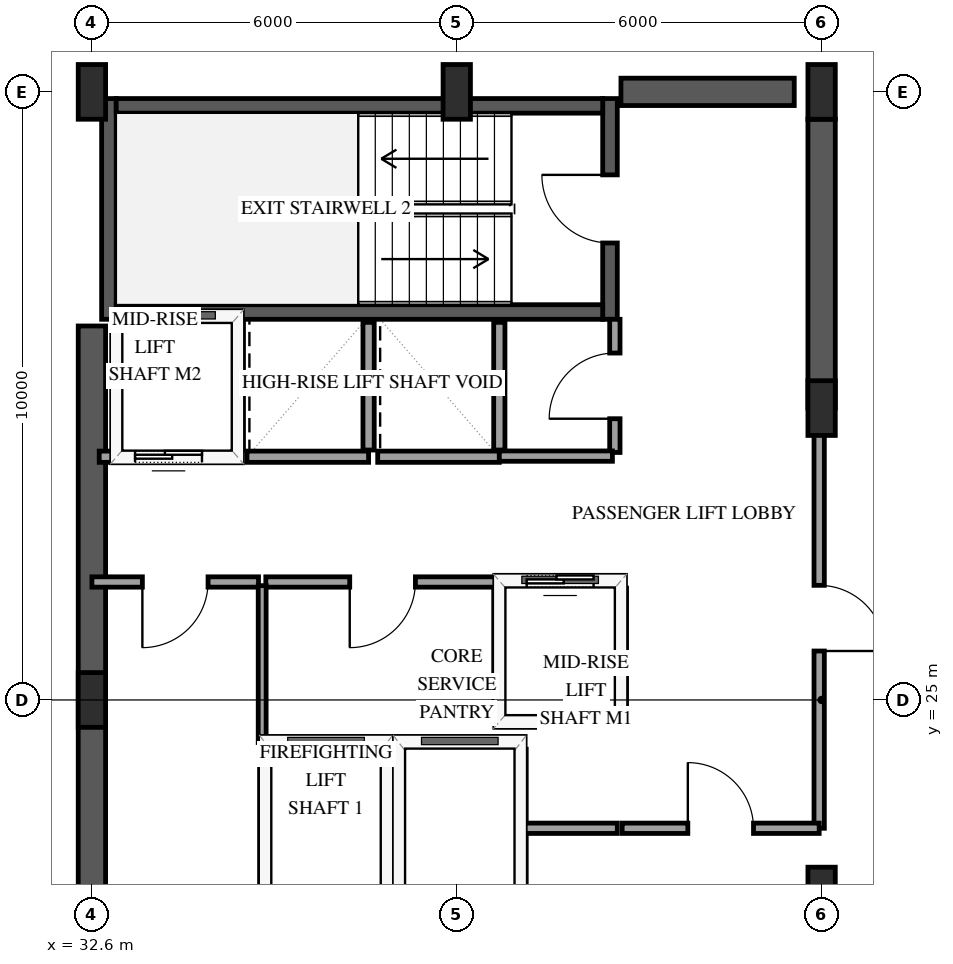
"""IFC4 building model, lengths in metres.
Left out: names, types, materials, properties, quantities, classifications, styles, units other than length and angle.
Written with IfcOpenShell. Run it as: python <this file> out.ifc"""

import sys

from ifc_helpers import new_model, si_unit, direction, frame, frame_2d, origin, origin_2d, place, context, subcontext, project, spatial, rectangle, extrude, element, fill, save


model = new_model("IFC4")
c1 = context("Model", 3, precision=1e-05, world=origin(), true_north=direction((0.0, 1.0)))
c2 = subcontext(c1, "Body", "Model", "MODEL_VIEW")
j1 = project(units=[si_unit("LENGTHUNIT", "METRE"), si_unit("PLANEANGLEUNIT", "RADIAN")], contexts=[c1])
p1 = place(None, origin())
s1 = spatial("IfcSite", under=j1, at=p1, CompositionType="ELEMENT")
p2 = place(p1, origin())
s2 = spatial("IfcBuilding", under=s1, at=p2, CompositionType="ELEMENT")
p3 = place(p2, frame((0.0, 0.0, 223.0)))
s3 = spatial("IfcBuildingStorey", under=s2, at=p3, CompositionType="ELEMENT", Elevation=223.0)
p4 = place(p3, frame((32.88, 31.26, 0.0), z_axis=(0.0, 0.0, 1.0), x_axis=(0.0, 1.0, 0.0)))
e1 = element("IfcWall", 1, at=p4, inside=s3, PredefinedType="SHEAR", context=c2, shape_type="SweptSolid", body=[
    extrude(rectangle(XDim=3.63, YDim=0.24, at=frame_2d((1.815, 0.0))), origin(), (0.0, 0.0, 1.0), 3.6),
])
p5 = place(p3, frame((41.12, 31.26, 0.0), z_axis=(0.0, 0.0, 1.0), x_axis=(0.0, 1.0, 0.0)))
e2 = element("IfcWall", 2, at=p5, inside=s3, PredefinedType="SHEAR", context=c2, shape_type="SweptSolid", body=[
    extrude(rectangle(XDim=3.63, YDim=0.24, at=frame_2d((1.815, 0.0))), origin(), (0.0, 0.0, 1.0), 3.6),
])
p6 = place(p5, frame((1.255, 0.0, 0.0)))
e3 = element("IfcOpeningElement", 3, at=p6, cuts=e2, PredefinedType="OPENING", context=c2, shape_type="SweptSolid", body=[
    extrude(rectangle(XDim=1.12, YDim=2.15, at=frame_2d((0.56, 1.075))), frame((0.0, 0.13, 0.0), z_axis=(0.0, -1.0, 0.0), x_axis=(1.0, 0.0, 0.0)), (0.0, 0.0, 1.0), 0.26),
])
for number, where, z_axis, x_axis in (
    (4, (33.0, 31.38, 0.0), (0.0, 0.0, 1.0), (1.0, 0.0, 0.0)),
    (5, (33.0, 34.77, 0.0), (0.0, 0.0, 1.0), (1.0, 0.0, 0.0)),
):
    element("IfcWall", number, at=place(p3, frame(where, z_axis=z_axis, x_axis=x_axis)), inside=s3, PredefinedType="SHEAR", context=c2, shape_type="SweptSolid", body=[
        extrude(rectangle(XDim=8.0, YDim=0.24, at=frame_2d((4.0, 0.0))), origin(), (0.0, 0.0, 1.0), 3.6),
    ])
p7 = place(p3, frame((32.6, 18.85, 0.0), z_axis=(0.0, 0.0, 1.0), x_axis=(0.0, 1.0, 0.0)))
e6 = element("IfcWall", 6, at=p7, inside=s3, PredefinedType="SHEAR", context=c2, shape_type="SweptSolid", body=[
    extrude(rectangle(XDim=12.3, YDim=0.45, at=frame_2d((6.15, 0.0))), origin(), (0.0, 0.0, 1.0), 3.6),
])
p8 = place(p3, frame((41.3, 35.0, 0.0), z_axis=(0.0, 0.0, 1.0), x_axis=(1.0, 0.0, 0.0)))
e7 = element("IfcWall", 7, at=p8, inside=s3, PredefinedType="SHEAR", context=c2, shape_type="SweptSolid", body=[
    extrude(rectangle(XDim=2.85, YDim=0.45, at=frame_2d((1.425, 0.0))), origin(), (0.0, 0.0, 1.0), 3.6),
])
p9 = place(p3, frame((44.6, 29.8, 0.0), z_axis=(0.0, 0.0, 1.0), x_axis=(0.0, 1.0, 0.0)))
e8 = element("IfcWall", 8, at=p9, inside=s3, PredefinedType="SHEAR", context=c2, shape_type="SweptSolid", body=[
    extrude(rectangle(XDim=4.75, YDim=0.45, at=frame_2d((2.375, 0.0))), origin(), (0.0, 0.0, 1.0), 3.6),
])
for number, where, z_axis, x_axis in (
    (9, (32.6, 25.0, 0.0), (0.0, 0.0, 1.0), (1.0, 0.0, 0.0)),
    (10, (32.6, 35.0, 0.0), (0.0, 0.0, 1.0), (1.0, 0.0, 0.0)),
    (11, (38.6, 35.0, 0.0), (0.0, 0.0, 1.0), (1.0, 0.0, 0.0)),
    (12, (44.6, 21.8, 0.0), (0.0, 0.0, 1.0), (1.0, 0.0, 0.0)),
    (13, (44.6, 29.8, 0.0), (0.0, 0.0, 1.0), (1.0, 0.0, 0.0)),
    (14, (44.6, 35.0, 0.0), (0.0, 0.0, 1.0), (1.0, 0.0, 0.0)),
):
    element("IfcColumn", number, at=place(p3, frame(where, z_axis=z_axis, x_axis=x_axis)), inside=s3, PredefinedType="PILASTER", context=c2, shape_type="SweptSolid", body=[
        extrude(rectangle(XDim=0.45, YDim=0.9, at=origin_2d()), origin(), (0.0, 0.0, 1.0), 3.6),
    ])
p10 = place(p3, frame((35.45, 24.3, 0.0), z_axis=(0.0, 0.0, 1.0), x_axis=(1.0, 0.0, 0.0)))
e15 = element("IfcWall", 15, at=p10, inside=s3, PredefinedType="SOLIDWALL", context=c2, shape_type="SweptSolid", body=[
    extrude(rectangle(XDim=2.0, YDim=0.185, at=frame_2d((1.0, 0.0))), origin(), (0.0, 0.0, 1.0), 3.3),
])
for number, where, z_axis, x_axis in (
    (16, (35.45, 21.81, 0.0), (0.0, 0.0, 1.0), (0.0, 1.0, 0.0)),
    (17, (37.45, 21.81, 0.0), (0.0, 0.0, 1.0), (0.0, 1.0, 0.0)),
):
    element("IfcWall", number, at=place(p3, frame(where, z_axis=z_axis, x_axis=x_axis)), inside=s3, PredefinedType="SOLIDWALL", context=c2, shape_type="SweptSolid", body=[
        extrude(rectangle(XDim=2.38, YDim=0.185, at=frame_2d((1.19, 0.0))), origin(), (0.0, 0.0, 1.0), 3.3),
    ])
p11 = place(p3, frame((37.65, 24.3, 0.0), z_axis=(0.0, 0.0, 1.0), x_axis=(1.0, 0.0, 0.0)))
e18 = element("IfcWall", 18, at=p11, inside=s3, PredefinedType="SOLIDWALL", context=c2, shape_type="SweptSolid", body=[
    extrude(rectangle(XDim=2.0, YDim=0.185, at=frame_2d((1.0, 0.0))), origin(), (0.0, 0.0, 1.0), 3.3),
])
p12 = place(p3, frame((39.65, 21.81, 0.0), z_axis=(0.0, 0.0, 1.0), x_axis=(0.0, 1.0, 0.0)))
e19 = element("IfcWall", 19, at=p12, inside=s3, PredefinedType="SOLIDWALL", context=c2, shape_type="SweptSolid", body=[
    extrude(rectangle(XDim=2.38, YDim=0.185, at=frame_2d((1.19, 0.0))), origin(), (0.0, 0.0, 1.0), 3.3),
])
p13 = place(p3, frame((39.3, 24.65, 0.0), z_axis=(0.0, 0.0, 1.0), x_axis=(1.0, 0.0, 0.0)))
e20 = element("IfcWall", 20, at=p13, inside=s3, PredefinedType="SOLIDWALL", context=c2, shape_type="SweptSolid", body=[
    extrude(rectangle(XDim=2.0, YDim=0.185, at=frame_2d((1.0, 0.0))), origin(), (0.0, 0.0, 1.0), 3.3),
])
p14 = place(p3, frame((39.3, 26.95, 0.0), z_axis=(0.0, 0.0, 1.0), x_axis=(1.0, 0.0, 0.0)))
e21 = element("IfcWall", 21, at=p14, inside=s3, PredefinedType="SOLIDWALL", context=c2, shape_type="SweptSolid", body=[
    extrude(rectangle(XDim=2.0, YDim=0.185, at=frame_2d((1.0, 0.0))), origin(), (0.0, 0.0, 1.0), 3.3),
])
p15 = place(p14, frame((0.45, 0.0, 0.0)))
e22 = element("IfcOpeningElement", 22, at=p15, cuts=e21, PredefinedType="OPENING", context=c2, shape_type="SweptSolid", body=[
    extrude(rectangle(XDim=1.1, YDim=2.15, at=frame_2d((0.55, 1.075))), frame((0.0, 0.103, 0.0), z_axis=(0.0, -1.0, 0.0), x_axis=(1.0, 0.0, 0.0)), (0.0, 0.0, 1.0), 0.205),
])
for number, where, z_axis, x_axis in (
    (23, (39.3, 24.76, 0.0), (0.0, 0.0, 1.0), (0.0, 1.0, 0.0)),
    (24, (41.3, 24.76, 0.0), (0.0, 0.0, 1.0), (0.0, 1.0, 0.0)),
):
    element("IfcWall", number, at=place(p3, frame(where, z_axis=z_axis, x_axis=x_axis)), inside=s3, PredefinedType="SOLIDWALL", context=c2, shape_type="SweptSolid", body=[
        extrude(rectangle(XDim=2.08, YDim=0.185, at=frame_2d((1.04, 0.0))), origin(), (0.0, 0.0, 1.0), 3.3),
    ])
p16 = place(p3, frame((32.72, 29.0, 0.0), z_axis=(0.0, 0.0, 1.0), x_axis=(1.0, 0.0, 0.0)))
e25 = element("IfcWall", 25, at=p16, inside=s3, PredefinedType="SOLIDWALL", context=c2, shape_type="SweptSolid", body=[
    extrude(rectangle(XDim=2.28, YDim=0.185, at=frame_2d((1.14, 0.0))), origin(), (0.0, 0.0, 1.0), 3.3),
])
p17 = place(p16, frame((0.59, 0.0, 0.0)))
e26 = element("IfcOpeningElement", 26, at=p17, cuts=e25, PredefinedType="OPENING", context=c2, shape_type="SweptSolid", body=[
    extrude(rectangle(XDim=1.1, YDim=2.15, at=frame_2d((0.55, 1.075))), frame((0.0, 0.103, 0.0), z_axis=(0.0, -1.0, 0.0), x_axis=(1.0, 0.0, 0.0)), (0.0, 0.0, 1.0), 0.205),
])
p18 = place(p3, frame((35.0, 29.11, 0.0), z_axis=(0.0, 0.0, 1.0), x_axis=(0.0, 1.0, 0.0)))
e27 = element("IfcWall", 27, at=p18, inside=s3, PredefinedType="SOLIDWALL", context=c2, shape_type="SweptSolid", body=[
    extrude(rectangle(XDim=2.1, YDim=0.185, at=frame_2d((1.05, 0.0))), origin(), (0.0, 0.0, 1.0), 3.3),
])
p19 = place(p3, frame((35.15, 29.0, 0.0), z_axis=(0.0, 0.0, 1.0), x_axis=(1.0, 0.0, 0.0)))
e28 = element("IfcWall", 28, at=p19, inside=s3, PredefinedType="SOLIDWALL", context=c2, shape_type="SweptSolid", body=[
    extrude(rectangle(XDim=2.0, YDim=0.185, at=frame_2d((1.0, 0.0))), origin(), (0.0, 0.0, 1.0), 3.3),
])
p20 = place(p3, frame((37.15, 29.11, 0.0), z_axis=(0.0, 0.0, 1.0), x_axis=(0.0, 1.0, 0.0)))
e29 = element("IfcWall", 29, at=p20, inside=s3, PredefinedType="SOLIDWALL", context=c2, shape_type="SweptSolid", body=[
    extrude(rectangle(XDim=2.1, YDim=0.185, at=frame_2d((1.05, 0.0))), origin(), (0.0, 0.0, 1.0), 3.3),
])
p21 = place(p3, frame((37.3, 29.0, 0.0), z_axis=(0.0, 0.0, 1.0), x_axis=(1.0, 0.0, 0.0)))
e30 = element("IfcWall", 30, at=p21, inside=s3, PredefinedType="SOLIDWALL", context=c2, shape_type="SweptSolid", body=[
    extrude(rectangle(XDim=2.0, YDim=0.185, at=frame_2d((1.0, 0.0))), origin(), (0.0, 0.0, 1.0), 3.3),
])
p22 = place(p3, frame((39.3, 29.11, 0.0), z_axis=(0.0, 0.0, 1.0), x_axis=(0.0, 1.0, 0.0)))
e31 = element("IfcWall", 31, at=p22, inside=s3, PredefinedType="SOLIDWALL", context=c2, shape_type="SweptSolid", body=[
    extrude(rectangle(XDim=2.1, YDim=0.185, at=frame_2d((1.05, 0.0))), origin(), (0.0, 0.0, 1.0), 3.3),
])
p23 = place(p3, frame((44.56, 29.8, 0.0), z_axis=(0.0, 0.0, 1.0), x_axis=(0.0, -1.0, 0.0)))
e32 = element("IfcWall", 32, at=p23, inside=s3, PredefinedType="PARTITIONING", context=c2, shape_type="SweptSolid", body=[
    extrude(rectangle(XDim=6.91, YDim=0.17, at=frame_2d((3.455, 0.0))), origin(), (0.0, 0.0, 1.0), 2.34),
])
p24 = place(p23, frame((2.915, 0.0, 0.0)))
e33 = element("IfcOpeningElement", 33, at=p24, cuts=e32, PredefinedType="OPENING", context=c2, shape_type="SweptSolid", body=[
    extrude(rectangle(XDim=1.08, YDim=2.15, at=frame_2d((0.54, 1.075))), frame((0.0, 0.095, 0.0), z_axis=(0.0, -1.0, 0.0), x_axis=(1.0, 0.0, 0.0)), (0.0, 0.0, 1.0), 0.19),
])
p25 = place(p3, frame((39.3, 26.94, 0.0), z_axis=(0.0, 0.0, 1.0), x_axis=(-1.0, 0.0, 0.0)))
e34 = element("IfcWall", 34, at=p25, inside=s3, PredefinedType="PARTITIONING", context=c2, shape_type="SweptSolid", body=[
    extrude(rectangle(XDim=3.84, YDim=0.17, at=frame_2d((1.92, 0.0))), origin(), (0.0, 0.0, 1.0), 3.3),
])
p26 = place(p25, frame((1.38, 0.0, 0.0)))
e35 = element("IfcOpeningElement", 35, at=p26, cuts=e34, PredefinedType="OPENING", context=c2, shape_type="SweptSolid", body=[
    extrude(rectangle(XDim=1.08, YDim=2.15, at=frame_2d((0.54, 1.075))), frame((0.0, 0.095, 0.0), z_axis=(0.0, -1.0, 0.0), x_axis=(1.0, 0.0, 0.0)), (0.0, 0.0, 1.0), 0.19),
])
p27 = place(p3, frame((41.32, 22.89, 0.0), z_axis=(0.0, 0.0, 1.0), x_axis=(1.0, 0.0, 0.0)))
e36 = element("IfcWall", 36, at=p27, inside=s3, PredefinedType="PARTITIONING", context=c2, shape_type="SweptSolid", body=[
    extrude(rectangle(XDim=3.24, YDim=0.17, at=frame_2d((1.62, 0.0))), origin(), (0.0, 0.0, 1.0), 3.3),
])
p28 = place(p27, frame((1.08, 0.0, 0.0)))
e37 = element("IfcOpeningElement", 37, at=p28, cuts=e36, PredefinedType="OPENING", context=c2, shape_type="SweptSolid", body=[
    extrude(rectangle(XDim=1.08, YDim=2.15, at=frame_2d((0.54, 1.075))), frame((0.0, 0.095, 0.0), z_axis=(0.0, -1.0, 0.0), x_axis=(1.0, 0.0, 0.0)), (0.0, 0.0, 1.0), 0.19),
])
p29 = place(p3, frame((35.34, 26.94, 0.0), z_axis=(0.0, 0.0, 1.0), x_axis=(-1.0, 0.0, 0.0)))
e38 = element("IfcWall", 38, at=p29, inside=s3, PredefinedType="PARTITIONING", context=c2, shape_type="SweptSolid", body=[
    extrude(rectangle(XDim=2.74, YDim=0.17, at=frame_2d((1.37, 0.0))), origin(), (0.0, 0.0, 1.0), 3.3),
])
p30 = place(p29, frame((0.83, 0.0, 0.0)))
e39 = element("IfcOpeningElement", 39, at=p30, cuts=e38, PredefinedType="OPENING", context=c2, shape_type="SweptSolid", body=[
    extrude(rectangle(XDim=1.08, YDim=2.15, at=frame_2d((0.54, 1.075))), frame((0.0, 0.095, 0.0), z_axis=(0.0, -1.0, 0.0), x_axis=(1.0, 0.0, 0.0)), (0.0, 0.0, 1.0), 0.19),
])
p31 = place(p3, frame((35.4, 26.88, 0.0), z_axis=(0.0, 0.0, 1.0), x_axis=(0.0, -1.0, 0.0)))
e40 = element("IfcWall", 40, at=p31, inside=s3, PredefinedType="PARTITIONING", context=c2, shape_type="SweptSolid", body=[
    extrude(rectangle(XDim=2.58, YDim=0.13, at=frame_2d((1.29, 0.0))), origin(), (0.0, 0.0, 1.0), 3.3),
])
p32 = place(p3, frame((41.2, 29.07, 0.0), z_axis=(0.0, 0.0, 1.0), x_axis=(0.0, 1.0, 0.0)))
e41 = element("IfcWall", 41, at=p32, inside=s3, PredefinedType="PARTITIONING", context=c2, shape_type="SweptSolid", body=[
    extrude(rectangle(XDim=2.19, YDim=0.17, at=frame_2d((1.095, 0.0))), origin(), (0.0, 0.0, 1.0), 3.3),
])
p33 = place(p32, frame((0.555, 0.0, 0.0)))
e42 = element("IfcOpeningElement", 42, at=p33, cuts=e41, PredefinedType="OPENING", context=c2, shape_type="SweptSolid", body=[
    extrude(rectangle(XDim=1.08, YDim=2.15, at=frame_2d((0.54, 1.075))), frame((0.0, 0.095, 0.0), z_axis=(0.0, -1.0, 0.0), x_axis=(1.0, 0.0, 0.0)), (0.0, 0.0, 1.0), 0.19),
])
p34 = place(p3, frame((39.3, 29.01, 0.0), z_axis=(0.0, 0.0, 1.0), x_axis=(1.0, 0.0, 0.0)))
e43 = element("IfcWall", 43, at=p34, inside=s3, PredefinedType="PARTITIONING", context=c2, shape_type="SweptSolid", body=[
    extrude(rectangle(XDim=1.86, YDim=0.17, at=frame_2d((0.93, 0.0))), origin(), (0.0, 0.0, 1.0), 3.3),
])
p35 = place(p3, frame((39.72, 22.89, 0.0), z_axis=(0.0, 0.0, 1.0), x_axis=(1.0, 0.0, 0.0)))
e44 = element("IfcWall", 44, at=p35, inside=s3, PredefinedType="PARTITIONING", context=c2, shape_type="SweptSolid", body=[
    extrude(rectangle(XDim=1.52, YDim=0.17, at=frame_2d((0.76, 0.0))), origin(), (0.0, 0.0, 1.0), 3.3),
])
p36 = place(p15, origin())
e45 = element("IfcDoor", 45, at=p36, inside=s3, OperationType="SLIDING_TO_LEFT", PredefinedType="DOOR", context=c2, shape_type="SweptSolid", body=[
    extrude(rectangle(XDim=1.1, YDim=2.15, at=frame_2d((0.55, 1.075))), frame((0.0, 0.025, 0.0), z_axis=(0.0, -1.0, 0.0), x_axis=(1.0, 0.0, 0.0)), (0.0, 0.0, 1.0), 0.05),
])
fill(e22, e45)
p37 = place(p17, origin())
e46 = element("IfcDoor", 46, at=p37, inside=s3, OperationType="SLIDING_TO_LEFT", PredefinedType="DOOR", context=c2, shape_type="SweptSolid", body=[
    extrude(rectangle(XDim=1.1, YDim=2.15, at=frame_2d((0.55, 1.075))), frame((0.0, 0.025, 0.0), z_axis=(0.0, -1.0, 0.0), x_axis=(1.0, 0.0, 0.0)), (0.0, 0.0, 1.0), 0.05),
])
fill(e26, e46)
p38 = place(p6, origin())
e47 = element("IfcDoor", 47, at=p38, inside=s3, OperationType="SINGLE_SWING_RIGHT", PredefinedType="DOOR", context=c2, shape_type="SweptSolid", body=[
    extrude(rectangle(XDim=1.12, YDim=2.15, at=frame_2d((0.56, 1.075))), frame((0.0, 0.025, 0.0), z_axis=(0.0, -1.0, 0.0), x_axis=(1.0, 0.0, 0.0)), (0.0, 0.0, 1.0), 0.05),
])
fill(e3, e47)
p39 = place(p24, origin())
e48 = element("IfcDoor", 48, at=p39, inside=s3, OperationType="SINGLE_SWING_RIGHT", PredefinedType="DOOR", context=c2, shape_type="SweptSolid", body=[
    extrude(rectangle(XDim=1.08, YDim=2.15, at=frame_2d((0.54, 1.075))), frame((0.0, 0.025, 0.0), z_axis=(0.0, -1.0, 0.0), x_axis=(1.0, 0.0, 0.0)), (0.0, 0.0, 1.0), 0.05),
])
fill(e33, e48)
p40 = place(p26, origin())
e49 = element("IfcDoor", 49, at=p40, inside=s3, OperationType="SINGLE_SWING_RIGHT", PredefinedType="DOOR", context=c2, shape_type="SweptSolid", body=[
    extrude(rectangle(XDim=1.08, YDim=2.15, at=frame_2d((0.54, 1.075))), frame((0.0, 0.025, 0.0), z_axis=(0.0, -1.0, 0.0), x_axis=(1.0, 0.0, 0.0)), (0.0, 0.0, 1.0), 0.05),
])
fill(e35, e49)
p41 = place(p28, origin())
e50 = element("IfcDoor", 50, at=p41, inside=s3, OperationType="SINGLE_SWING_LEFT", PredefinedType="DOOR", context=c2, shape_type="SweptSolid", body=[
    extrude(rectangle(XDim=1.08, YDim=2.15, at=frame_2d((0.54, 1.075))), frame((0.0, 0.025, 0.0), z_axis=(0.0, -1.0, 0.0), x_axis=(1.0, 0.0, 0.0)), (0.0, 0.0, 1.0), 0.05),
])
fill(e37, e50)
p42 = place(p30, origin())
e51 = element("IfcDoor", 51, at=p42, inside=s3, OperationType="SINGLE_SWING_RIGHT", PredefinedType="DOOR", context=c2, shape_type="SweptSolid", body=[
    extrude(rectangle(XDim=1.08, YDim=2.15, at=frame_2d((0.54, 1.075))), frame((0.0, 0.025, 0.0), z_axis=(0.0, -1.0, 0.0), x_axis=(1.0, 0.0, 0.0)), (0.0, 0.0, 1.0), 0.05),
])
fill(e39, e51)
p43 = place(p33, origin())
e52 = element("IfcDoor", 52, at=p43, inside=s3, OperationType="SINGLE_SWING_LEFT", PredefinedType="DOOR", context=c2, shape_type="SweptSolid", body=[
    extrude(rectangle(XDim=1.08, YDim=2.15, at=frame_2d((0.54, 1.075))), frame((0.0, 0.025, 0.0), z_axis=(0.0, -1.0, 0.0), x_axis=(1.0, 0.0, 0.0)), (0.0, 0.0, 1.0), 0.05),
])
fill(e42, e52)
save(model, sys.argv[1])
